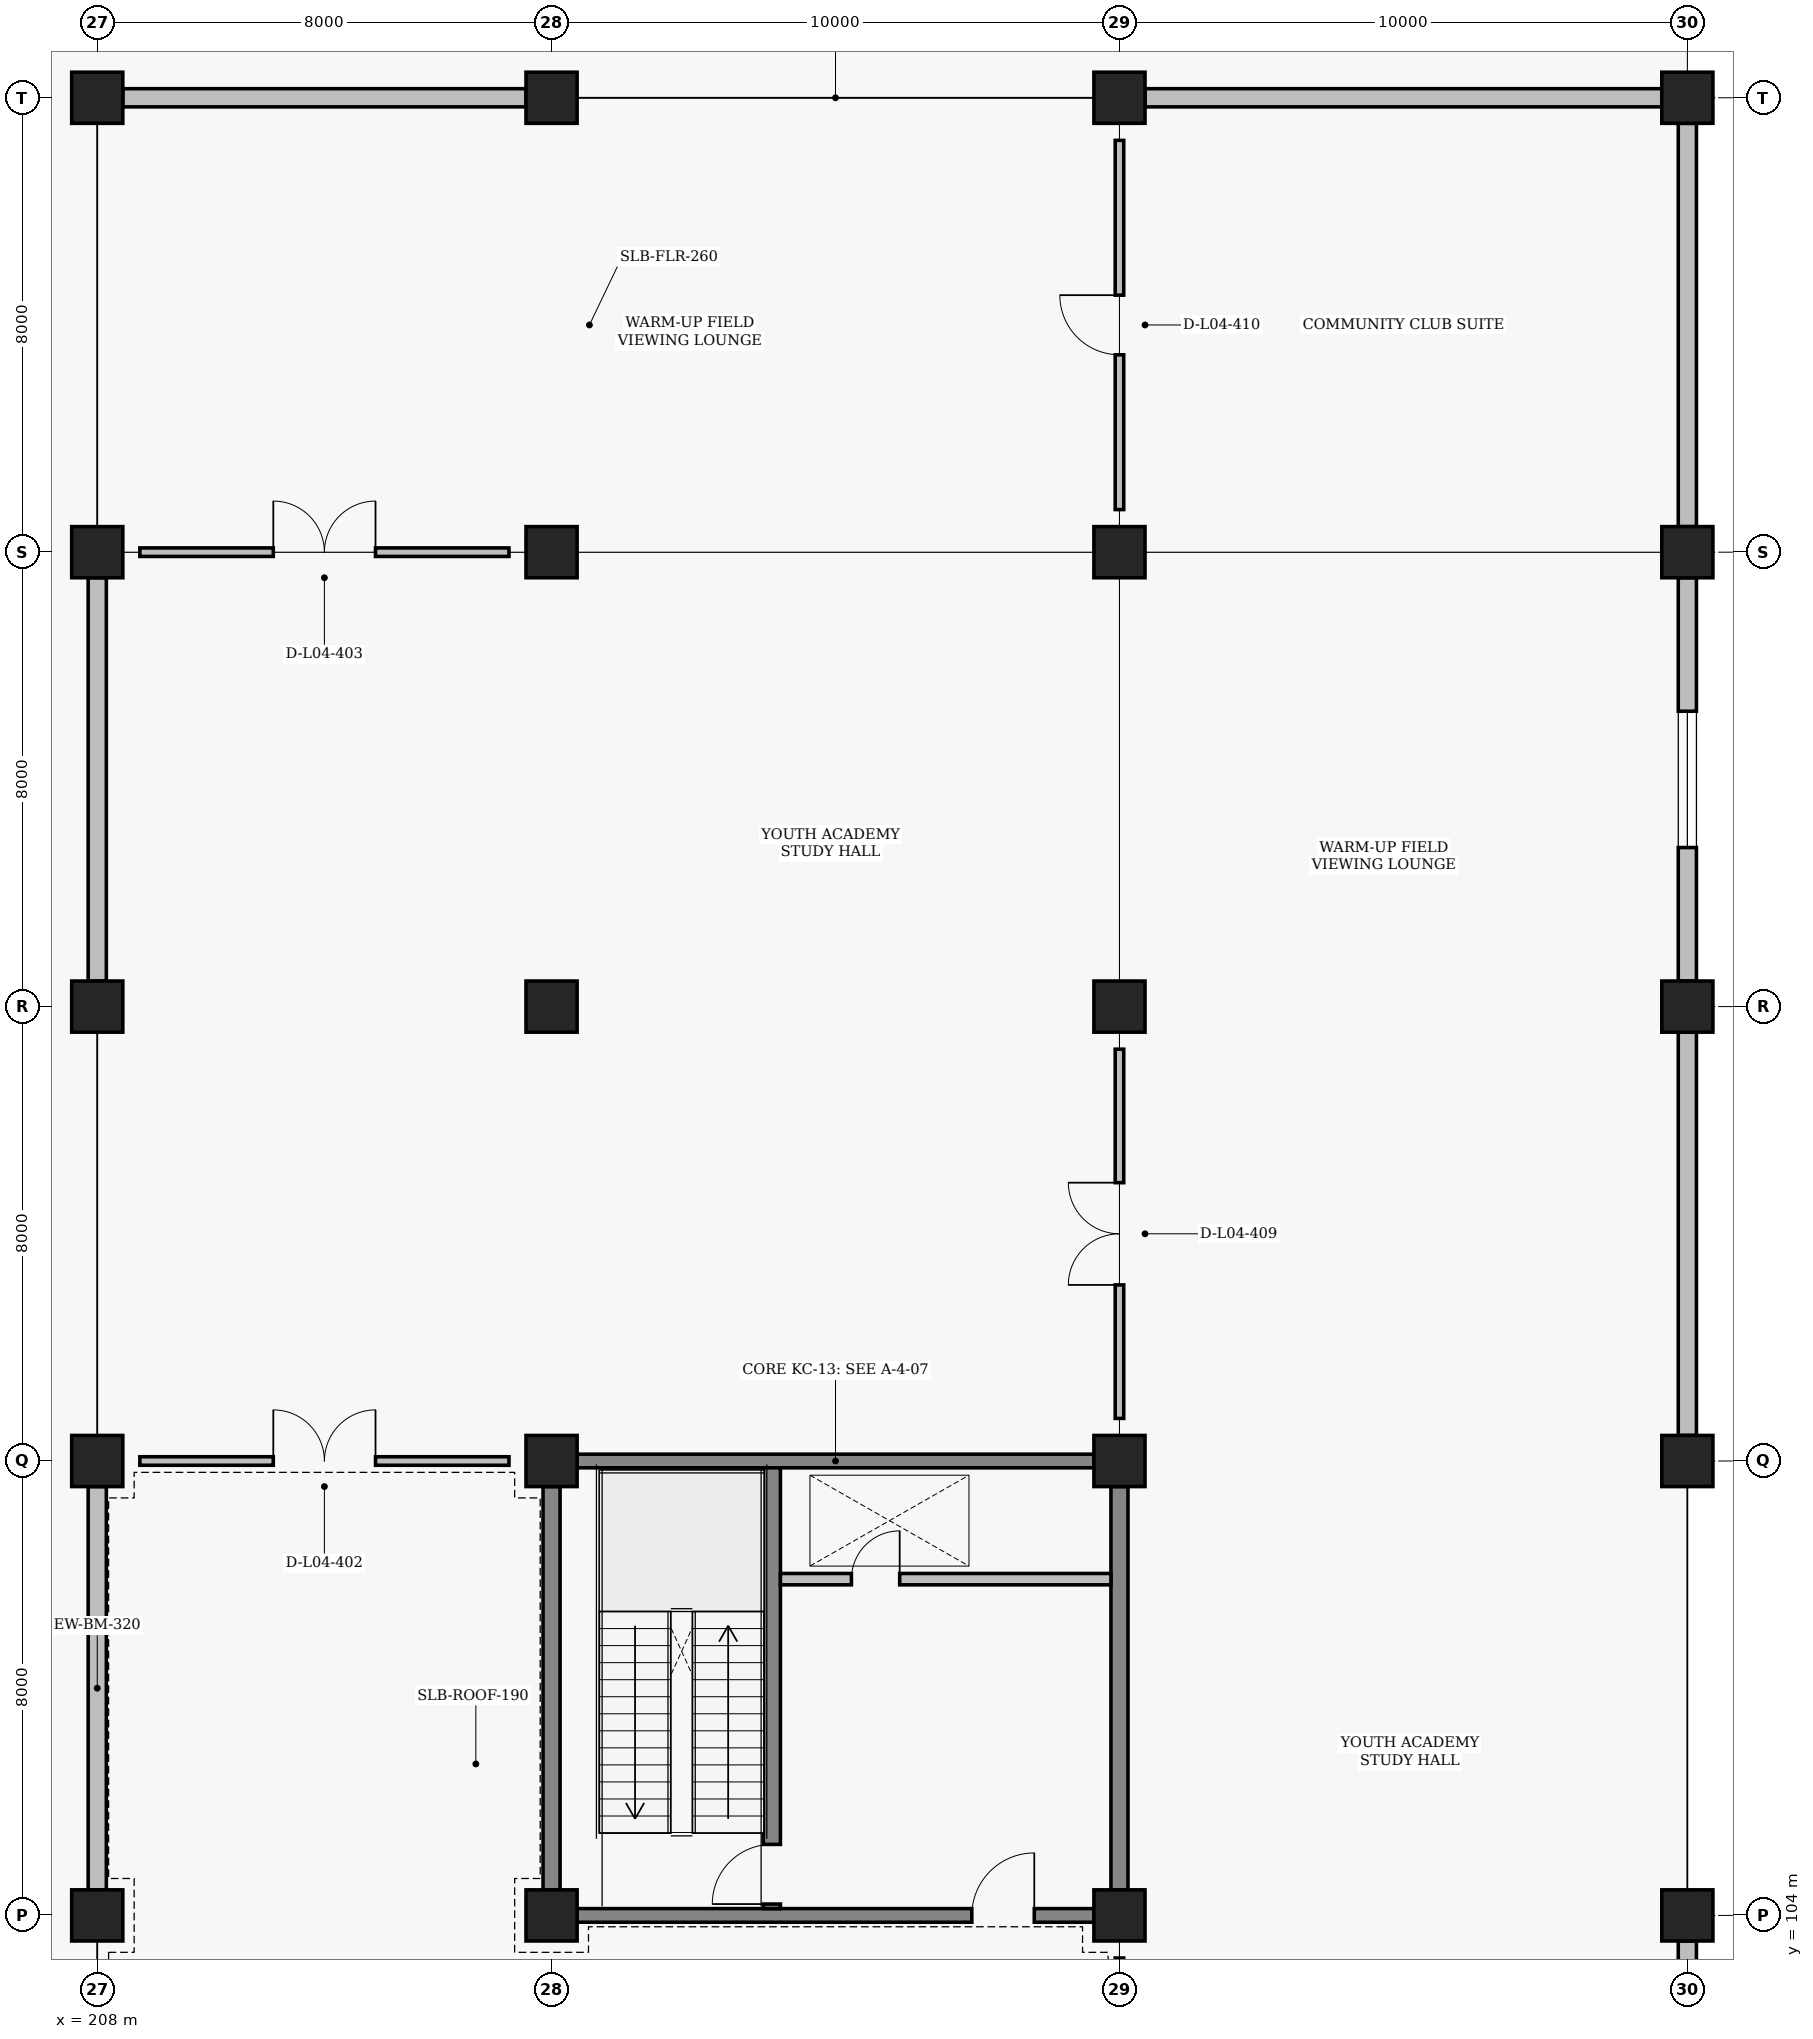
"""IFC4 building model, lengths in metres.
Left out: names, types, materials, properties, quantities, classifications, styles, units other than length and angle.
Written with IfcOpenShell. Run it as: python <this file> out.ifc"""

import sys

from ifc_helpers import new_model, si_unit, direction, frame, frame_2d, origin, origin_2d, place, context, subcontext, project, spatial, rectangle, extrude, element, fill, save


model = new_model("IFC4")
c1 = context("Model", 3, precision=1e-05, world=origin(), true_north=direction((0.0, 1.0)))
c2 = subcontext(c1, "Body", "Model", "MODEL_VIEW")
j1 = project(units=[si_unit("LENGTHUNIT", "METRE"), si_unit("PLANEANGLEUNIT", "RADIAN")], contexts=[c1])
p1 = place(None, origin())
s1 = spatial("IfcSite", under=j1, at=p1, CompositionType="ELEMENT")
p2 = place(p1, origin())
s2 = spatial("IfcBuilding", under=s1, at=p2, CompositionType="ELEMENT")
p3 = place(p2, frame((0.0, 0.0, 14.4)))
s3 = spatial("IfcBuildingStorey", under=s2, at=p3, CompositionType="ELEMENT", Elevation=14.4)
for number, where, z_axis, x_axis in (
    (1, (208.0, 104.0, 0.0), (0.0, 0.0, 1.0), (1.0, 0.0, 0.0)),
    (2, (208.0, 112.0, 0.0), (0.0, 0.0, 1.0), (1.0, 0.0, 0.0)),
    (3, (208.0, 120.0, 0.0), (0.0, 0.0, 1.0), (1.0, 0.0, 0.0)),
    (4, (208.0, 128.0, 0.0), (0.0, 0.0, 1.0), (1.0, 0.0, 0.0)),
    (5, (208.0, 136.0, 0.0), (0.0, 0.0, 1.0), (1.0, 0.0, 0.0)),
    (6, (216.0, 104.0, 0.0), (0.0, 0.0, 1.0), (1.0, 0.0, 0.0)),
    (7, (216.0, 112.0, 0.0), (0.0, 0.0, 1.0), (1.0, 0.0, 0.0)),
    (8, (216.0, 120.0, 0.0), (0.0, 0.0, 1.0), (1.0, 0.0, 0.0)),
    (9, (216.0, 128.0, 0.0), (0.0, 0.0, 1.0), (1.0, 0.0, 0.0)),
    (10, (216.0, 136.0, 0.0), (0.0, 0.0, 1.0), (1.0, 0.0, 0.0)),
    (11, (226.0, 104.0, 0.0), (0.0, 0.0, 1.0), (1.0, 0.0, 0.0)),
    (12, (226.0, 112.0, 0.0), (0.0, 0.0, 1.0), (1.0, 0.0, 0.0)),
    (13, (226.0, 120.0, 0.0), (0.0, 0.0, 1.0), (1.0, 0.0, 0.0)),
    (14, (226.0, 128.0, 0.0), (0.0, 0.0, 1.0), (1.0, 0.0, 0.0)),
    (15, (226.0, 136.0, 0.0), (0.0, 0.0, 1.0), (1.0, 0.0, 0.0)),
    (16, (236.0, 104.0, 0.0), (0.0, 0.0, 1.0), (1.0, 0.0, 0.0)),
    (17, (236.0, 112.0, 0.0), (0.0, 0.0, 1.0), (1.0, 0.0, 0.0)),
    (18, (236.0, 120.0, 0.0), (0.0, 0.0, 1.0), (1.0, 0.0, 0.0)),
    (19, (236.0, 128.0, 0.0), (0.0, 0.0, 1.0), (1.0, 0.0, 0.0)),
    (20, (236.0, 136.0, 0.0), (0.0, 0.0, 1.0), (1.0, 0.0, 0.0)),
):
    element("IfcColumn", number, at=place(p3, frame(where, z_axis=z_axis, x_axis=x_axis)), inside=s3, PredefinedType="COLUMN", context=c2, shape_type="SweptSolid", body=[
        extrude(rectangle(XDim=0.9, YDim=0.9, at=origin_2d()), origin(), (0.0, 0.0, 1.0), 4.2),
    ])
for number, where, z_axis, x_axis in (
    (21, (208.0, 104.45, 0.0), (0.0, 0.0, 1.0), (0.0, 1.0, 0.0)),
    (22, (208.0, 120.45, 0.0), (0.0, 0.0, 1.0), (0.0, 1.0, 0.0)),
):
    element("IfcWall", number, at=place(p3, frame(where, z_axis=z_axis, x_axis=x_axis)), inside=s3, PredefinedType="SOLIDWALL", context=c2, shape_type="SweptSolid", body=[
        extrude(rectangle(XDim=7.1, YDim=0.32, at=frame_2d((3.55, 0.0))), origin(), (0.0, 0.0, 1.0), 3.33),
    ])
p4 = place(p3, frame((208.45, 136.0, 0.0), z_axis=(0.0, 0.0, 1.0), x_axis=(1.0, 0.0, 0.0)))
e23 = element("IfcWall", 23, at=p4, inside=s3, PredefinedType="SOLIDWALL", context=c2, shape_type="SweptSolid", body=[
    extrude(rectangle(XDim=7.1, YDim=0.32, at=frame_2d((3.55, 0.0))), origin(), (0.0, 0.0, 1.0), 3.35),
])
for number, where, z_axis, x_axis in (
    (24, (236.0, 96.45, 0.0), (0.0, 0.0, 1.0), (0.0, 1.0, 0.0)),
    (25, (236.0, 112.45, 0.0), (0.0, 0.0, 1.0), (0.0, 1.0, 0.0)),
):
    element("IfcWall", number, at=place(p3, frame(where, z_axis=z_axis, x_axis=x_axis)), inside=s3, PredefinedType="SOLIDWALL", context=c2, shape_type="SweptSolid", body=[
        extrude(rectangle(XDim=7.1, YDim=0.32, at=frame_2d((3.55, 0.0))), origin(), (0.0, 0.0, 1.0), 3.23),
    ])
p5 = place(p3, frame((236.0, 120.45, 0.0), z_axis=(0.0, 0.0, 1.0), x_axis=(0.0, 1.0, 0.0)))
e26 = element("IfcWall", 26, at=p5, inside=s3, PredefinedType="SOLIDWALL", context=c2, shape_type="SweptSolid", body=[
    extrude(rectangle(XDim=7.1, YDim=0.32, at=frame_2d((3.55, 0.0))), origin(), (0.0, 0.0, 1.0), 3.23),
])
p6 = place(p5, frame((2.35, 0.0, 0.95)))
e27 = element("IfcOpeningElement", 27, at=p6, cuts=e26, PredefinedType="OPENING", context=c2, shape_type="SweptSolid", body=[
    extrude(rectangle(XDim=2.4, YDim=2.0, at=frame_2d((1.2, 1.0))), frame((0.0, 0.17, 0.0), z_axis=(0.0, -1.0, 0.0), x_axis=(1.0, 0.0, 0.0)), (0.0, 0.0, 1.0), 0.34),
])
p7 = place(p3, frame((226.45, 136.0, 0.0), z_axis=(0.0, 0.0, 1.0), x_axis=(1.0, 0.0, 0.0)))
e28 = element("IfcWall", 28, at=p7, inside=s3, PredefinedType="SOLIDWALL", context=c2, shape_type="SweptSolid", body=[
    extrude(rectangle(XDim=9.1, YDim=0.32, at=frame_2d((4.55, 0.0))), origin(), (0.0, 0.0, 1.0), 3.35),
])
p8 = place(p3, frame((236.0, 128.45, 0.0), z_axis=(0.0, 0.0, 1.0), x_axis=(0.0, 1.0, 0.0)))
e29 = element("IfcWall", 29, at=p8, inside=s3, PredefinedType="SOLIDWALL", context=c2, shape_type="SweptSolid", body=[
    extrude(rectangle(XDim=7.1, YDim=0.32, at=frame_2d((3.55, 0.0))), origin(), (0.0, 0.0, 1.0), 3.23),
])
p9 = place(p3, frame((216.45, 104.0, 0.0), z_axis=(0.0, 0.0, 1.0), x_axis=(1.0, 0.0, 0.0)))
e30 = element("IfcWall", 30, at=p9, inside=s3, PredefinedType="SHEAR", context=c2, shape_type="SweptSolid", body=[
    extrude(rectangle(XDim=9.1, YDim=0.24, at=frame_2d((4.55, 0.0))), origin(), (0.0, 0.0, 1.0), 3.23),
])
p10 = place(p9, frame((6.95, 0.0, 0.0)))
e31 = element("IfcOpeningElement", 31, at=p10, cuts=e30, PredefinedType="OPENING", context=c2, shape_type="SweptSolid", body=[
    extrude(rectangle(XDim=1.1, YDim=2.2, at=frame_2d((0.55, 1.1))), frame((0.0, 0.13, 0.0), z_axis=(0.0, -1.0, 0.0), x_axis=(1.0, 0.0, 0.0)), (0.0, 0.0, 1.0), 0.26),
])
p11 = place(p3, frame((216.45, 112.0, 0.0), z_axis=(0.0, 0.0, 1.0), x_axis=(1.0, 0.0, 0.0)))
e32 = element("IfcWall", 32, at=p11, inside=s3, PredefinedType="SHEAR", context=c2, shape_type="SweptSolid", body=[
    extrude(rectangle(XDim=9.1, YDim=0.24, at=frame_2d((4.55, 0.0))), origin(), (0.0, 0.0, 1.0), 3.23),
])
p12 = place(p3, frame((216.0, 104.45, 0.0), z_axis=(0.0, 0.0, 1.0), x_axis=(0.0, 1.0, 0.0)))
e33 = element("IfcWall", 33, at=p12, inside=s3, PredefinedType="SHEAR", context=c2, shape_type="SweptSolid", body=[
    extrude(rectangle(XDim=7.1, YDim=0.3, at=frame_2d((3.55, 0.0))), origin(), (0.0, 0.0, 1.0), 3.33),
])
p13 = place(p3, frame((226.0, 104.45, 0.0), z_axis=(0.0, 0.0, 1.0), x_axis=(0.0, 1.0, 0.0)))
e34 = element("IfcWall", 34, at=p13, inside=s3, PredefinedType="SHEAR", context=c2, shape_type="SweptSolid", body=[
    extrude(rectangle(XDim=7.1, YDim=0.3, at=frame_2d((3.55, 0.0))), origin(), (0.0, 0.0, 1.0), 3.23),
])
p14 = place(p3, frame((219.88, 104.12, 0.0), z_axis=(0.0, 0.0, 1.0), x_axis=(0.0, 1.0, 0.0)))
e35 = element("IfcWall", 35, at=p14, inside=s3, PredefinedType="SHEAR", context=c2, shape_type="SweptSolid", body=[
    extrude(rectangle(XDim=7.76, YDim=0.3, at=frame_2d((3.88, 0.0))), origin(), (0.0, 0.0, 1.0), 3.43),
])
p15 = place(p14, frame((0.08, 0.0, 0.0)))
e36 = element("IfcOpeningElement", 36, at=p15, cuts=e35, PredefinedType="OPENING", context=c2, shape_type="SweptSolid", body=[
    extrude(rectangle(XDim=1.05, YDim=2.15, at=frame_2d((0.525, 1.075))), frame((0.0, 0.16, 0.0), z_axis=(0.0, -1.0, 0.0), x_axis=(1.0, 0.0, 0.0)), (0.0, 0.0, 1.0), 0.32),
])
p16 = place(p3, frame((220.03, 109.92, 0.0), z_axis=(0.0, 0.0, 1.0), x_axis=(1.0, 0.0, 0.0)))
e37 = element("IfcWall", 37, at=p16, inside=s3, PredefinedType="PARTITIONING", context=c2, shape_type="SweptSolid", body=[
    extrude(rectangle(XDim=5.82, YDim=0.2, at=frame_2d((2.91, 0.0))), origin(), (0.0, 0.0, 1.0), 3.33),
])
p17 = place(p16, frame((1.25, 0.0, 0.0)))
e38 = element("IfcOpeningElement", 38, at=p17, cuts=e37, PredefinedType="OPENING", context=c2, shape_type="SweptSolid", body=[
    extrude(rectangle(XDim=0.85, YDim=2.05, at=frame_2d((0.425, 1.025))), frame((0.0, 0.11, 0.0), z_axis=(0.0, -1.0, 0.0), x_axis=(1.0, 0.0, 0.0)), (0.0, 0.0, 1.0), 0.22),
])
p18 = place(p3, frame((208.75, 112.0, 0.0), z_axis=(0.0, 0.0, 1.0), x_axis=(1.0, 0.0, 0.0)))
e39 = element("IfcWall", 39, at=p18, inside=s3, PredefinedType="PARTITIONING", context=c2, shape_type="SweptSolid", body=[
    extrude(rectangle(XDim=6.5, YDim=0.15, at=frame_2d((3.25, 0.0))), origin(), (0.0, 0.0, 1.0), 3.43),
])
p19 = place(p18, frame((2.35, 0.0, 0.0)))
e40 = element("IfcOpeningElement", 40, at=p19, cuts=e39, PredefinedType="OPENING", context=c2, shape_type="SweptSolid", body=[
    extrude(rectangle(XDim=1.8, YDim=2.3, at=frame_2d((0.9, 1.15))), frame((0.0, 0.085, 0.0), z_axis=(0.0, -1.0, 0.0), x_axis=(1.0, 0.0, 0.0)), (0.0, 0.0, 1.0), 0.17),
])
p20 = place(p3, frame((208.75, 128.0, 0.0), z_axis=(0.0, 0.0, 1.0), x_axis=(1.0, 0.0, 0.0)))
e41 = element("IfcWall", 41, at=p20, inside=s3, PredefinedType="PARTITIONING", context=c2, shape_type="SweptSolid", body=[
    extrude(rectangle(XDim=6.5, YDim=0.15, at=frame_2d((3.25, 0.0))), origin(), (0.0, 0.0, 1.0), 3.43),
])
p21 = place(p20, frame((2.35, 0.0, 0.0)))
e42 = element("IfcOpeningElement", 42, at=p21, cuts=e41, PredefinedType="OPENING", context=c2, shape_type="SweptSolid", body=[
    extrude(rectangle(XDim=1.8, YDim=2.3, at=frame_2d((0.9, 1.15))), frame((0.0, 0.085, 0.0), z_axis=(0.0, -1.0, 0.0), x_axis=(1.0, 0.0, 0.0)), (0.0, 0.0, 1.0), 0.17),
])
p22 = place(p3, frame((226.0, 96.75, 0.0), z_axis=(0.0, 0.0, 1.0), x_axis=(0.0, 1.0, 0.0)))
e43 = element("IfcWall", 43, at=p22, inside=s3, PredefinedType="PARTITIONING", context=c2, shape_type="SweptSolid", body=[
    extrude(rectangle(XDim=6.5, YDim=0.15, at=frame_2d((3.25, 0.0))), origin(), (0.0, 0.0, 1.0), 3.33),
])
p23 = place(p22, frame((2.35, 0.0, 0.0)))
e44 = element("IfcOpeningElement", 44, at=p23, cuts=e43, PredefinedType="OPENING", context=c2, shape_type="SweptSolid", body=[
    extrude(rectangle(XDim=1.8, YDim=2.3, at=frame_2d((0.9, 1.15))), frame((0.0, 0.085, 0.0), z_axis=(0.0, -1.0, 0.0), x_axis=(1.0, 0.0, 0.0)), (0.0, 0.0, 1.0), 0.17),
])
p24 = place(p3, frame((226.0, 112.75, 0.0), z_axis=(0.0, 0.0, 1.0), x_axis=(0.0, 1.0, 0.0)))
e45 = element("IfcWall", 45, at=p24, inside=s3, PredefinedType="PARTITIONING", context=c2, shape_type="SweptSolid", body=[
    extrude(rectangle(XDim=6.5, YDim=0.15, at=frame_2d((3.25, 0.0))), origin(), (0.0, 0.0, 1.0), 3.33),
])
p25 = place(p24, frame((2.35, 0.0, 0.0)))
e46 = element("IfcOpeningElement", 46, at=p25, cuts=e45, PredefinedType="OPENING", context=c2, shape_type="SweptSolid", body=[
    extrude(rectangle(XDim=1.8, YDim=2.3, at=frame_2d((0.9, 1.15))), frame((0.0, 0.085, 0.0), z_axis=(0.0, -1.0, 0.0), x_axis=(1.0, 0.0, 0.0)), (0.0, 0.0, 1.0), 0.17),
])
p26 = place(p3, frame((226.0, 128.75, 0.0), z_axis=(0.0, 0.0, 1.0), x_axis=(0.0, 1.0, 0.0)))
e47 = element("IfcWall", 47, at=p26, inside=s3, PredefinedType="PARTITIONING", context=c2, shape_type="SweptSolid", body=[
    extrude(rectangle(XDim=6.5, YDim=0.15, at=frame_2d((3.25, 0.0))), origin(), (0.0, 0.0, 1.0), 3.37),
])
p27 = place(p26, frame((2.725, 0.0, 0.0)))
e48 = element("IfcOpeningElement", 48, at=p27, cuts=e47, PredefinedType="OPENING", context=c2, shape_type="SweptSolid", body=[
    extrude(rectangle(XDim=1.05, YDim=2.15, at=frame_2d((0.525, 1.075))), frame((0.0, 0.085, 0.0), z_axis=(0.0, -1.0, 0.0), x_axis=(1.0, 0.0, 0.0)), (0.0, 0.0, 1.0), 0.17),
])
p28 = place(p6, origin())
e49 = element("IfcWindow", 49, at=p28, inside=s3, PartitioningType="SINGLE_PANEL", PredefinedType="WINDOW", context=c2, shape_type="SweptSolid", body=[
    extrude(rectangle(XDim=2.4, YDim=2.0, at=frame_2d((1.2, 1.0))), frame((0.0, 0.03, 0.0), z_axis=(0.0, -1.0, 0.0), x_axis=(1.0, 0.0, 0.0)), (0.0, 0.0, 1.0), 0.06),
])
fill(e27, e49)
p29 = place(p10, origin())
e50 = element("IfcDoor", 50, at=p29, inside=s3, OperationType="SINGLE_SWING_RIGHT", PredefinedType="DOOR", context=c2, shape_type="SweptSolid", body=[
    extrude(rectangle(XDim=1.1, YDim=2.2, at=frame_2d((0.55, 1.1))), frame((0.0, 0.025, 0.0), z_axis=(0.0, -1.0, 0.0), x_axis=(1.0, 0.0, 0.0)), (0.0, 0.0, 1.0), 0.05),
])
fill(e31, e50)
p30 = place(p15, origin())
e51 = element("IfcDoor", 51, at=p30, inside=s3, OperationType="SINGLE_SWING_LEFT", PredefinedType="DOOR", context=c2, shape_type="SweptSolid", body=[
    extrude(rectangle(XDim=1.05, YDim=2.15, at=frame_2d((0.525, 1.075))), frame((0.0, 0.025, 0.0), z_axis=(0.0, -1.0, 0.0), x_axis=(1.0, 0.0, 0.0)), (0.0, 0.0, 1.0), 0.05),
])
fill(e36, e51)
p31 = place(p17, origin())
e52 = element("IfcDoor", 52, at=p31, inside=s3, OperationType="SINGLE_SWING_RIGHT", PredefinedType="TRAPDOOR", context=c2, shape_type="SweptSolid", body=[
    extrude(rectangle(XDim=0.85, YDim=2.05, at=frame_2d((0.425, 1.025))), frame((0.0, 0.025, 0.0), z_axis=(0.0, -1.0, 0.0), x_axis=(1.0, 0.0, 0.0)), (0.0, 0.0, 1.0), 0.05),
])
fill(e38, e52)
p32 = place(p19, origin())
e53 = element("IfcDoor", 53, at=p32, inside=s3, OperationType="DOUBLE_SWING_LEFT", PredefinedType="DOOR", context=c2, shape_type="SweptSolid", body=[
    extrude(rectangle(XDim=1.8, YDim=2.3, at=frame_2d((0.9, 1.15))), frame((0.0, 0.025, 0.0), z_axis=(0.0, -1.0, 0.0), x_axis=(1.0, 0.0, 0.0)), (0.0, 0.0, 1.0), 0.05),
])
fill(e40, e53)
p33 = place(p21, origin())
e54 = element("IfcDoor", 54, at=p33, inside=s3, OperationType="DOUBLE_SWING_LEFT", PredefinedType="DOOR", context=c2, shape_type="SweptSolid", body=[
    extrude(rectangle(XDim=1.8, YDim=2.3, at=frame_2d((0.9, 1.15))), frame((0.0, 0.025, 0.0), z_axis=(0.0, -1.0, 0.0), x_axis=(1.0, 0.0, 0.0)), (0.0, 0.0, 1.0), 0.05),
])
fill(e42, e54)
p34 = place(p25, origin())
e55 = element("IfcDoor", 55, at=p34, inside=s3, OperationType="DOUBLE_SWING_LEFT", PredefinedType="DOOR", context=c2, shape_type="SweptSolid", body=[
    extrude(rectangle(XDim=1.8, YDim=2.3, at=frame_2d((0.9, 1.15))), frame((0.0, 0.025, 0.0), z_axis=(0.0, -1.0, 0.0), x_axis=(1.0, 0.0, 0.0)), (0.0, 0.0, 1.0), 0.05),
])
fill(e46, e55)
p35 = place(p27, origin())
e56 = element("IfcDoor", 56, at=p35, inside=s3, OperationType="SINGLE_SWING_RIGHT", PredefinedType="DOOR", context=c2, shape_type="SweptSolid", body=[
    extrude(rectangle(XDim=1.05, YDim=2.15, at=frame_2d((0.525, 1.075))), frame((0.0, 0.025, 0.0), z_axis=(0.0, -1.0, 0.0), x_axis=(1.0, 0.0, 0.0)), (0.0, 0.0, 1.0), 0.05),
])
fill(e48, e56)
save(model, sys.argv[1])
